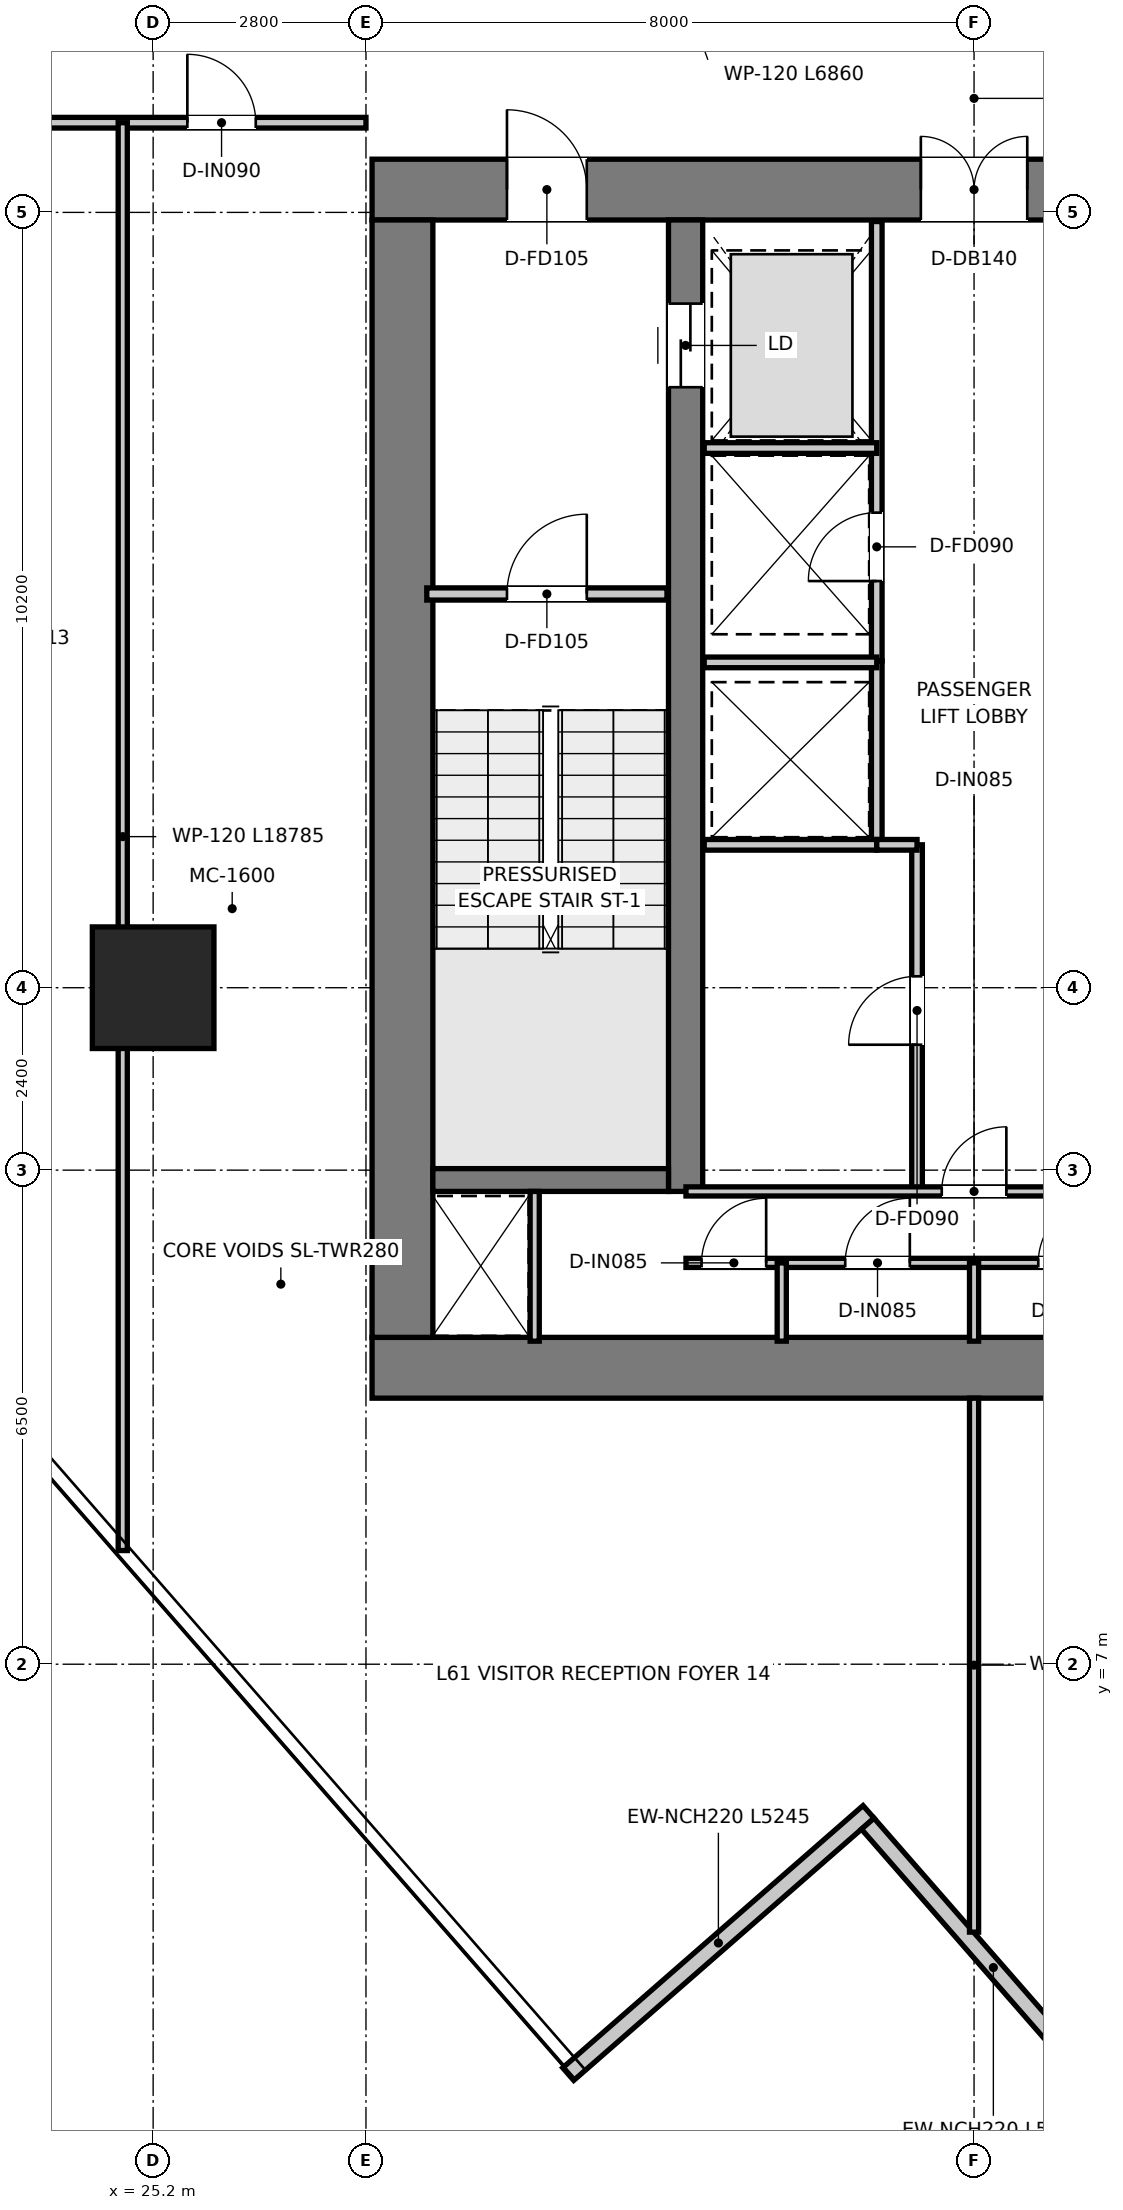
"""IFC4 building model, lengths in metres.
Left out: names, types, materials, properties, quantities, classifications, styles, units other than length and angle.
Written with IfcOpenShell. Run it as: python <this file> out.ifc"""

import sys

from ifc_helpers import new_model, si_unit, direction, frame, frame_2d, origin, origin_2d, place, context, subcontext, project, spatial, rectangle, extrude, source, transform, mapped, element, fill, save


model = new_model("IFC4")
c1 = context("Model", 3, precision=1e-05, world=origin(), true_north=direction((0.0, 1.0)))
c2 = subcontext(c1, "Body", "Model", "MODEL_VIEW")
j1 = project(units=[si_unit("LENGTHUNIT", "METRE"), si_unit("PLANEANGLEUNIT", "RADIAN")], contexts=[c1])
p1 = place(None, origin())
s1 = spatial("IfcSite", under=j1, at=p1, CompositionType="ELEMENT")
p2 = place(p1, origin())
s2 = spatial("IfcBuilding", under=s1, at=p2, CompositionType="ELEMENT")
p3 = place(p2, frame((0.0, 0.0, 250.75)))
s3 = spatial("IfcBuildingStorey", under=s2, at=p3, CompositionType="ELEMENT", Elevation=250.75)
p4 = place(p3, frame((28.08, 10.9, 0.0), z_axis=(0.0, 0.0, 1.0), x_axis=(1.0, 0.0, 0.0)))
e1 = element("IfcWall", 1, at=p4, inside=s3, PredefinedType="SHEAR", context=c2, shape_type="SweptSolid", body=[
    extrude(rectangle(XDim=15.84, YDim=0.8, at=frame_2d((7.92, 0.0))), origin(), (0.0, 0.0, 1.0), 3.95),
])
p5 = place(p3, frame((28.08, 26.4, 0.0), z_axis=(0.0, 0.0, 1.0), x_axis=(1.0, 0.0, 0.0)))
e2 = element("IfcWall", 2, at=p5, inside=s3, PredefinedType="SHEAR", context=c2, shape_type="SweptSolid", body=[
    extrude(rectangle(XDim=15.84, YDim=0.8, at=frame_2d((7.92, 0.0))), origin(), (0.0, 0.0, 1.0), 3.95),
])
p6 = place(p5, frame((7.22, 0.0, 0.0)))
e3 = element("IfcOpeningElement", 3, at=p6, cuts=e2, PredefinedType="OPENING", context=c2, shape_type="SweptSolid", body=[
    extrude(rectangle(XDim=1.4, YDim=2.2, at=frame_2d((0.7, 1.1))), frame((0.0, 0.41, 0.0), z_axis=(0.0, -1.0, 0.0), x_axis=(1.0, 0.0, 0.0)), (0.0, 0.0, 1.0), 0.82),
])
p7 = place(p5, frame((1.775, 0.0, 0.0)))
e4 = element("IfcOpeningElement", 4, at=p7, cuts=e2, PredefinedType="OPENING", context=c2, shape_type="SweptSolid", body=[
    extrude(rectangle(XDim=1.05, YDim=2.1, at=frame_2d((0.525, 1.05))), frame((0.0, 0.41, 0.0), z_axis=(0.0, -1.0, 0.0), x_axis=(1.0, 0.0, 0.0)), (0.0, 0.0, 1.0), 0.82),
])
p8 = place(p5, frame((13.015, 0.0, 0.0)))
e5 = element("IfcOpeningElement", 5, at=p8, cuts=e2, PredefinedType="OPENING", context=c2, shape_type="SweptSolid", body=[
    extrude(rectangle(XDim=1.05, YDim=2.1, at=frame_2d((0.525, 1.05))), frame((0.0, 0.41, 0.0), z_axis=(0.0, -1.0, 0.0), x_axis=(1.0, 0.0, 0.0)), (0.0, 0.0, 1.0), 0.82),
])
p9 = place(p3, frame((28.48, 11.3, 0.0), z_axis=(0.0, 0.0, 1.0), x_axis=(0.0, 1.0, 0.0)))
e6 = element("IfcWall", 6, at=p9, inside=s3, PredefinedType="SHEAR", context=c2, shape_type="SweptSolid", body=[
    extrude(rectangle(XDim=14.7, YDim=0.8, at=frame_2d((7.35, 0.0))), origin(), (0.0, 0.0, 1.0), 3.95),
])
p10 = place(p3, frame((32.205, 13.22, 0.0), z_axis=(0.0, 0.0, 1.0), x_axis=(0.0, 1.0, 0.0)))
e7 = element("IfcWall", 7, at=p10, inside=s3, PredefinedType="SHEAR", context=c2, shape_type="SweptSolid", body=[
    extrude(rectangle(XDim=12.78, YDim=0.45, at=frame_2d((6.39, 0.0))), origin(), (0.0, 0.0, 1.0), 3.95),
])
p11 = place(p10, frame((10.58, 0.0, 0.0)))
e8 = element("IfcOpeningElement", 8, at=p11, cuts=e7, PredefinedType="OPENING", context=c2, shape_type="SweptSolid", body=[
    extrude(rectangle(XDim=1.1, YDim=2.15, at=frame_2d((0.55, 1.075))), frame((0.0, 0.235, 0.0), z_axis=(0.0, -1.0, 0.0), x_axis=(1.0, 0.0, 0.0)), (0.0, 0.0, 1.0), 0.47),
])
p12 = place(p3, frame((28.88, 13.37, 0.0), z_axis=(0.0, 0.0, 1.0), x_axis=(1.0, 0.0, 0.0)))
e9 = element("IfcWall", 9, at=p12, inside=s3, PredefinedType="SHEAR", context=c2, shape_type="SweptSolid", body=[
    extrude(rectangle(XDim=3.1, YDim=0.3, at=frame_2d((1.55, 0.0))), origin(), (0.0, 0.0, 1.0), 3.95),
])
m1 = source(origin(), c2, "Body", "SweptSolid", [
    extrude(rectangle(XDim=1.6, YDim=1.6, at=origin_2d()), origin(), (0.0, 0.0, 1.0), 3.95),
])
p13 = place(p3, frame((25.2, 15.9, 0.0), z_axis=(0.0, 0.0, 1.0), x_axis=(1.0, 0.0, 0.0)))
e10 = element("IfcColumn", 10, at=p13, inside=s3, PredefinedType="USERDEFINED", context=c2, shape_type="MappedRepresentation", body=[
    mapped(m1, transform((0.0, 0.0, 0.0), x_axis=(1.0, 0.0, 0.0), y_axis=(0.0, 1.0, 0.0), z_axis=(0.0, 0.0, 1.0), scale=1.0)),
])
p14 = place(p3, frame((30.661, 1.608, 0.0), z_axis=(0.0, 0.0, 1.0), x_axis=(0.7532711863, 0.657710057617, 0.0)))
e11 = element("IfcWall", 11, at=p14, inside=s3, PredefinedType="ELEMENTEDWALL", context=c2, shape_type="SweptSolid", body=[
    extrude(rectangle(XDim=5.245, YDim=0.22, at=frame_2d((2.623, 0.0))), origin(), (0.0, 0.0, 1.0), 3.67),
])
p15 = place(p3, frame((34.602, 4.902, 0.0), z_axis=(0.0, 0.0, 1.0), x_axis=(0.657706226339, -0.753274531518, 0.0)))
e12 = element("IfcWall", 12, at=p15, inside=s3, PredefinedType="ELEMENTEDWALL", context=c2, shape_type="SweptSolid", body=[
    extrude(rectangle(XDim=5.025, YDim=0.22, at=frame_2d((2.512, 0.0))), origin(), (0.0, 0.0, 1.0), 3.67),
])
p16 = place(p3, frame((28.8, 21.08, 0.0), z_axis=(0.0, 0.0, 1.0), x_axis=(1.0, 0.0, 0.0)))
e13 = element("IfcWall", 13, at=p16, inside=s3, PredefinedType="PARTITIONING", context=c2, shape_type="SweptSolid", body=[
    extrude(rectangle(XDim=3.16, YDim=0.16, at=frame_2d((1.58, 0.0))), origin(), (0.0, 0.0, 1.0), 3.67),
])
p17 = place(p16, frame((1.055, 0.0, 0.0)))
e14 = element("IfcOpeningElement", 14, at=p17, cuts=e13, PredefinedType="OPENING", context=c2, shape_type="SweptSolid", body=[
    extrude(rectangle(XDim=1.05, YDim=2.1, at=frame_2d((0.525, 1.05))), frame((0.0, 0.09, 0.0), z_axis=(0.0, -1.0, 0.0), x_axis=(1.0, 0.0, 0.0)), (0.0, 0.0, 1.0), 0.18),
])
p18 = place(p3, frame((34.72, 20.2, 0.0), z_axis=(0.0, 0.0, 1.0), x_axis=(0.0, 1.0, 0.0)))
e15 = element("IfcWall", 15, at=p18, inside=s3, PredefinedType="PARTITIONING", context=c2, shape_type="SweptSolid", body=[
    extrude(rectangle(XDim=5.78, YDim=0.14, at=frame_2d((2.89, 0.0))), origin(), (0.0, 0.0, 1.0), 2.82),
])
p19 = place(p18, frame((1.05, 0.0, 0.0)))
e16 = element("IfcOpeningElement", 16, at=p19, cuts=e15, PredefinedType="OPENING", context=c2, shape_type="SweptSolid", body=[
    extrude(rectangle(XDim=0.9, YDim=2.1, at=frame_2d((0.45, 1.05))), frame((0.0, 0.08, 0.0), z_axis=(0.0, -1.0, 0.0), x_axis=(1.0, 0.0, 0.0)), (0.0, 0.0, 1.0), 0.16),
])
p20 = place(p3, frame((32.45, 23.0, 0.0), z_axis=(0.0, 0.0, 1.0), x_axis=(1.0, 0.0, 0.0)))
e17 = element("IfcWall", 17, at=p20, inside=s3, PredefinedType="PARTITIONING", context=c2, shape_type="SweptSolid", body=[
    extrude(rectangle(XDim=2.27, YDim=0.14, at=frame_2d((1.135, 0.0))), origin(), (0.0, 0.0, 1.0), 2.82),
])
p21 = place(p3, frame((34.72, 17.78, 0.0), z_axis=(0.0, 0.0, 1.0), x_axis=(0.0, 1.0, 0.0)))
e18 = element("IfcWall", 18, at=p21, inside=s3, PredefinedType="PARTITIONING", context=c2, shape_type="SweptSolid", body=[
    extrude(rectangle(XDim=2.42, YDim=0.14, at=frame_2d((1.21, 0.0))), origin(), (0.0, 0.0, 1.0), 3.67),
])
for number, where, z_axis, x_axis in (
    (19, (32.45, 17.78, 0.0), (0.0, 0.0, 1.0), (1.0, 0.0, 0.0)),
    (20, (32.45, 20.18, 0.0), (0.0, 0.0, 1.0), (1.0, 0.0, 0.0)),
):
    element("IfcWall", number, at=place(p3, frame(where, z_axis=z_axis, x_axis=x_axis)), inside=s3, PredefinedType="PARTITIONING", context=c2, shape_type="SweptSolid", body=[
        extrude(rectangle(XDim=2.27, YDim=0.14, at=frame_2d((1.135, 0.0))), origin(), (0.0, 0.0, 1.0), 3.67),
    ])
p22 = place(p3, frame((35.25, 13.22, 0.0), z_axis=(0.0, 0.0, 1.0), x_axis=(0.0, 1.0, 0.0)))
e21 = element("IfcWall", 21, at=p22, inside=s3, PredefinedType="PARTITIONING", context=c2, shape_type="SweptSolid", body=[
    extrude(rectangle(XDim=4.56, YDim=0.14, at=frame_2d((2.28, 0.0))), origin(), (0.0, 0.0, 1.0), 3.67),
])
p23 = place(p22, frame((1.93, 0.0, 0.0)))
e22 = element("IfcOpeningElement", 22, at=p23, cuts=e21, PredefinedType="OPENING", context=c2, shape_type="SweptSolid", body=[
    extrude(rectangle(XDim=0.9, YDim=2.1, at=frame_2d((0.45, 1.05))), frame((0.0, 0.08, 0.0), z_axis=(0.0, -1.0, 0.0), x_axis=(1.0, 0.0, 0.0)), (0.0, 0.0, 1.0), 0.16),
])
p24 = place(p3, frame((34.72, 17.78, 0.0), z_axis=(0.0, 0.0, 1.0), x_axis=(1.0, 0.0, 0.0)))
e23 = element("IfcWall", 23, at=p24, inside=s3, PredefinedType="PARTITIONING", context=c2, shape_type="SweptSolid", body=[
    extrude(rectangle(XDim=0.53, YDim=0.14, at=frame_2d((0.265, 0.0))), origin(), (0.0, 0.0, 1.0), 3.67),
])
p25 = place(p3, frame((30.22, 11.25, 0.0), z_axis=(0.0, 0.0, 1.0), x_axis=(0.0, 1.0, 0.0)))
e24 = element("IfcWall", 24, at=p25, inside=s3, PredefinedType="PARTITIONING", context=c2, shape_type="SweptSolid", body=[
    extrude(rectangle(XDim=1.97, YDim=0.12, at=frame_2d((0.985, 0.0))), origin(), (0.0, 0.0, 1.0), 3.67),
])
p26 = place(p3, frame((32.21, 13.22, 0.0), z_axis=(0.0, 0.0, 1.0), x_axis=(1.0, 0.0, 0.0)))
e25 = element("IfcWall", 25, at=p26, inside=s3, PredefinedType="PARTITIONING", context=c2, shape_type="SweptSolid", body=[
    extrude(rectangle(XDim=7.58, YDim=0.12, at=frame_2d((3.79, 0.0))), origin(), (0.0, 0.0, 1.0), 3.67),
])
p27 = place(p26, frame((3.365, 0.0, 0.0)))
e26 = element("IfcOpeningElement", 26, at=p27, cuts=e25, PredefinedType="OPENING", context=c2, shape_type="SweptSolid", body=[
    extrude(rectangle(XDim=0.85, YDim=2.1, at=frame_2d((0.425, 1.05))), frame((0.0, 0.07, 0.0), z_axis=(0.0, -1.0, 0.0), x_axis=(1.0, 0.0, 0.0)), (0.0, 0.0, 1.0), 0.14),
])
p28 = place(p3, frame((32.21, 12.28, 0.0), z_axis=(0.0, 0.0, 1.0), x_axis=(1.0, 0.0, 0.0)))
e27 = element("IfcWall", 27, at=p28, inside=s3, PredefinedType="PARTITIONING", context=c2, shape_type="SweptSolid", body=[
    extrude(rectangle(XDim=7.58, YDim=0.12, at=frame_2d((3.79, 0.0))), origin(), (0.0, 0.0, 1.0), 3.67),
])
p29 = place(p28, frame((0.205, 0.0, 0.0)))
e28 = element("IfcOpeningElement", 28, at=p29, cuts=e27, PredefinedType="OPENING", context=c2, shape_type="SweptSolid", body=[
    extrude(rectangle(XDim=0.85, YDim=2.1, at=frame_2d((0.425, 1.05))), frame((0.0, 0.07, 0.0), z_axis=(0.0, -1.0, 0.0), x_axis=(1.0, 0.0, 0.0)), (0.0, 0.0, 1.0), 0.14),
])
p30 = place(p28, frame((2.095, 0.0, 0.0)))
e29 = element("IfcOpeningElement", 29, at=p30, cuts=e27, PredefinedType="OPENING", context=c2, shape_type="SweptSolid", body=[
    extrude(rectangle(XDim=0.85, YDim=2.1, at=frame_2d((0.425, 1.05))), frame((0.0, 0.07, 0.0), z_axis=(0.0, -1.0, 0.0), x_axis=(1.0, 0.0, 0.0)), (0.0, 0.0, 1.0), 0.14),
])
p31 = place(p28, frame((4.635, 0.0, 0.0)))
e30 = element("IfcOpeningElement", 30, at=p31, cuts=e27, PredefinedType="OPENING", context=c2, shape_type="SweptSolid", body=[
    extrude(rectangle(XDim=0.85, YDim=2.1, at=frame_2d((0.425, 1.05))), frame((0.0, 0.07, 0.0), z_axis=(0.0, -1.0, 0.0), x_axis=(1.0, 0.0, 0.0)), (0.0, 0.0, 1.0), 0.14),
])
p32 = place(p28, frame((6.525, 0.0, 0.0)))
e31 = element("IfcOpeningElement", 31, at=p32, cuts=e27, PredefinedType="OPENING", context=c2, shape_type="SweptSolid", body=[
    extrude(rectangle(XDim=0.85, YDim=2.1, at=frame_2d((0.425, 1.05))), frame((0.0, 0.07, 0.0), z_axis=(0.0, -1.0, 0.0), x_axis=(1.0, 0.0, 0.0)), (0.0, 0.0, 1.0), 0.14),
])
for number, where, z_axis, x_axis in (
    (32, (33.47, 11.25, 0.0), (0.0, 0.0, 1.0), (0.0, 1.0, 0.0)),
    (33, (36.0, 11.25, 0.0), (0.0, 0.0, 1.0), (0.0, 1.0, 0.0)),
):
    element("IfcWall", number, at=place(p3, frame(where, z_axis=z_axis, x_axis=x_axis)), inside=s3, PredefinedType="PARTITIONING", context=c2, shape_type="SweptSolid", body=[
        extrude(rectangle(XDim=1.03, YDim=0.12, at=frame_2d((0.515, 0.0))), origin(), (0.0, 0.0, 1.0), 3.67),
    ])
p33 = place(p3, frame((13.439, 27.28, 0.0), z_axis=(0.0, 0.0, 1.0), x_axis=(1.0, 0.0, 0.0)))
e34 = element("IfcWall", 34, at=p33, inside=s3, PredefinedType="PARTITIONING", context=c2, shape_type="SweptSolid", body=[
    extrude(rectangle(XDim=14.561, YDim=0.14, at=frame_2d((7.28, 0.0))), origin(), (0.0, 0.0, 1.0), 3.03),
])
p34 = place(p33, frame((1.347, 0.0, 0.0)))
e35 = element("IfcOpeningElement", 35, at=p34, cuts=e34, PredefinedType="OPENING", context=c2, shape_type="SweptSolid", body=[
    extrude(rectangle(XDim=0.9, YDim=2.1, at=frame_2d((0.45, 1.05))), frame((0.0, 0.08, 0.0), z_axis=(0.0, -1.0, 0.0), x_axis=(1.0, 0.0, 0.0)), (0.0, 0.0, 1.0), 0.16),
])
p35 = place(p33, frame((8.91, 0.0, 0.0)))
e36 = element("IfcOpeningElement", 36, at=p35, cuts=e34, PredefinedType="OPENING", context=c2, shape_type="SweptSolid", body=[
    extrude(rectangle(XDim=0.9, YDim=2.1, at=frame_2d((0.45, 1.05))), frame((0.0, 0.08, 0.0), z_axis=(0.0, -1.0, 0.0), x_axis=(1.0, 0.0, 0.0)), (0.0, 0.0, 1.0), 0.16),
])
p36 = place(p33, frame((12.21, 0.0, 0.0)))
e37 = element("IfcOpeningElement", 37, at=p36, cuts=e34, PredefinedType="OPENING", context=c2, shape_type="SweptSolid", body=[
    extrude(rectangle(XDim=0.9, YDim=2.1, at=frame_2d((0.45, 1.05))), frame((0.0, 0.08, 0.0), z_axis=(0.0, -1.0, 0.0), x_axis=(1.0, 0.0, 0.0)), (0.0, 0.0, 1.0), 0.16),
])
p37 = place(p3, frame((36.0, 3.475, 0.0), z_axis=(0.0, 0.0, 1.0), x_axis=(0.0, 1.0, 0.0)))
e38 = element("IfcWall", 38, at=p37, inside=s3, PredefinedType="PARTITIONING", context=c2, shape_type="SweptSolid", body=[
    extrude(rectangle(XDim=7.025, YDim=0.12, at=frame_2d((3.512, 0.0))), origin(), (0.0, 0.0, 1.0), 3.67),
])
p38 = place(p3, frame((24.8, 8.495, 0.0), z_axis=(0.0, 0.0, 1.0), x_axis=(0.0, 1.0, 0.0)))
e39 = element("IfcWall", 39, at=p38, inside=s3, PredefinedType="PARTITIONING", context=c2, shape_type="SweptSolid", body=[
    extrude(rectangle(XDim=18.785, YDim=0.12, at=frame_2d((9.392, 0.0))), origin(), (0.0, 0.0, 1.0), 3.18),
])
p39 = place(p17, origin())
e40 = element("IfcDoor", 40, at=p39, inside=s3, OperationType="SINGLE_SWING_RIGHT", PredefinedType="DOOR", context=c2, shape_type="SweptSolid", body=[
    extrude(rectangle(XDim=1.05, YDim=2.1, at=frame_2d((0.525, 1.05))), frame((0.0, 0.025, 0.0), z_axis=(0.0, -1.0, 0.0), x_axis=(1.0, 0.0, 0.0)), (0.0, 0.0, 1.0), 0.05),
])
fill(e14, e40)
p40 = place(p6, origin())
e41 = element("IfcDoor", 41, at=p40, inside=s3, OperationType="DOUBLE_DOOR_SINGLE_SWING", PredefinedType="DOOR", context=c2, shape_type="SweptSolid", body=[
    extrude(rectangle(XDim=1.4, YDim=2.2, at=frame_2d((0.7, 1.1))), frame((0.0, 0.025, 0.0), z_axis=(0.0, -1.0, 0.0), x_axis=(1.0, 0.0, 0.0)), (0.0, 0.0, 1.0), 0.05),
])
fill(e3, e41)
p41 = place(p7, origin())
e42 = element("IfcDoor", 42, at=p41, inside=s3, OperationType="SINGLE_SWING_LEFT", PredefinedType="DOOR", context=c2, shape_type="SweptSolid", body=[
    extrude(rectangle(XDim=1.05, YDim=2.1, at=frame_2d((0.525, 1.05))), frame((0.0, 0.025, 0.0), z_axis=(0.0, -1.0, 0.0), x_axis=(1.0, 0.0, 0.0)), (0.0, 0.0, 1.0), 0.05),
])
fill(e4, e42)
p42 = place(p11, origin())
e43 = element("IfcDoor", 43, at=p42, inside=s3, OperationType="DOUBLE_DOOR_SLIDING", PredefinedType="DOOR", context=c2, shape_type="SweptSolid", body=[
    extrude(rectangle(XDim=1.1, YDim=2.15, at=frame_2d((0.55, 1.075))), frame((0.0, 0.025, 0.0), z_axis=(0.0, -1.0, 0.0), x_axis=(1.0, 0.0, 0.0)), (0.0, 0.0, 1.0), 0.05),
])
fill(e8, e43)
p43 = place(p19, origin())
e44 = element("IfcDoor", 44, at=p43, inside=s3, OperationType="SINGLE_SWING_LEFT", PredefinedType="DOOR", context=c2, shape_type="SweptSolid", body=[
    extrude(rectangle(XDim=0.9, YDim=2.1, at=frame_2d((0.45, 1.05))), frame((0.0, 0.025, 0.0), z_axis=(0.0, -1.0, 0.0), x_axis=(1.0, 0.0, 0.0)), (0.0, 0.0, 1.0), 0.05),
])
fill(e16, e44)
p44 = place(p23, origin())
e45 = element("IfcDoor", 45, at=p44, inside=s3, OperationType="SINGLE_SWING_LEFT", PredefinedType="DOOR", context=c2, shape_type="SweptSolid", body=[
    extrude(rectangle(XDim=0.9, YDim=2.1, at=frame_2d((0.45, 1.05))), frame((0.0, 0.025, 0.0), z_axis=(0.0, -1.0, 0.0), x_axis=(1.0, 0.0, 0.0)), (0.0, 0.0, 1.0), 0.05),
])
fill(e22, e45)
p45 = place(p27, origin())
e46 = element("IfcDoor", 46, at=p45, inside=s3, OperationType="SINGLE_SWING_RIGHT", PredefinedType="DOOR", context=c2, shape_type="SweptSolid", body=[
    extrude(rectangle(XDim=0.85, YDim=2.1, at=frame_2d((0.425, 1.05))), frame((0.0, 0.025, 0.0), z_axis=(0.0, -1.0, 0.0), x_axis=(1.0, 0.0, 0.0)), (0.0, 0.0, 1.0), 0.05),
])
fill(e26, e46)
p46 = place(p29, origin())
e47 = element("IfcDoor", 47, at=p46, inside=s3, OperationType="SINGLE_SWING_RIGHT", PredefinedType="DOOR", context=c2, shape_type="SweptSolid", body=[
    extrude(rectangle(XDim=0.85, YDim=2.1, at=frame_2d((0.425, 1.05))), frame((0.0, 0.025, 0.0), z_axis=(0.0, -1.0, 0.0), x_axis=(1.0, 0.0, 0.0)), (0.0, 0.0, 1.0), 0.05),
])
fill(e28, e47)
p47 = place(p30, origin())
e48 = element("IfcDoor", 48, at=p47, inside=s3, OperationType="SINGLE_SWING_RIGHT", PredefinedType="DOOR", context=c2, shape_type="SweptSolid", body=[
    extrude(rectangle(XDim=0.85, YDim=2.1, at=frame_2d((0.425, 1.05))), frame((0.0, 0.025, 0.0), z_axis=(0.0, -1.0, 0.0), x_axis=(1.0, 0.0, 0.0)), (0.0, 0.0, 1.0), 0.05),
])
fill(e29, e48)
p48 = place(p31, origin())
e49 = element("IfcDoor", 49, at=p48, inside=s3, OperationType="SINGLE_SWING_RIGHT", PredefinedType="DOOR", context=c2, shape_type="SweptSolid", body=[
    extrude(rectangle(XDim=0.85, YDim=2.1, at=frame_2d((0.425, 1.05))), frame((0.0, 0.025, 0.0), z_axis=(0.0, -1.0, 0.0), x_axis=(1.0, 0.0, 0.0)), (0.0, 0.0, 1.0), 0.05),
])
fill(e30, e49)
p49 = place(p36, origin())
e50 = element("IfcDoor", 50, at=p49, inside=s3, OperationType="SINGLE_SWING_LEFT", PredefinedType="DOOR", context=c2, shape_type="SweptSolid", body=[
    extrude(rectangle(XDim=0.9, YDim=2.1, at=frame_2d((0.45, 1.05))), frame((0.0, 0.025, 0.0), z_axis=(0.0, -1.0, 0.0), x_axis=(1.0, 0.0, 0.0)), (0.0, 0.0, 1.0), 0.05),
])
fill(e37, e50)
save(model, sys.argv[1])
